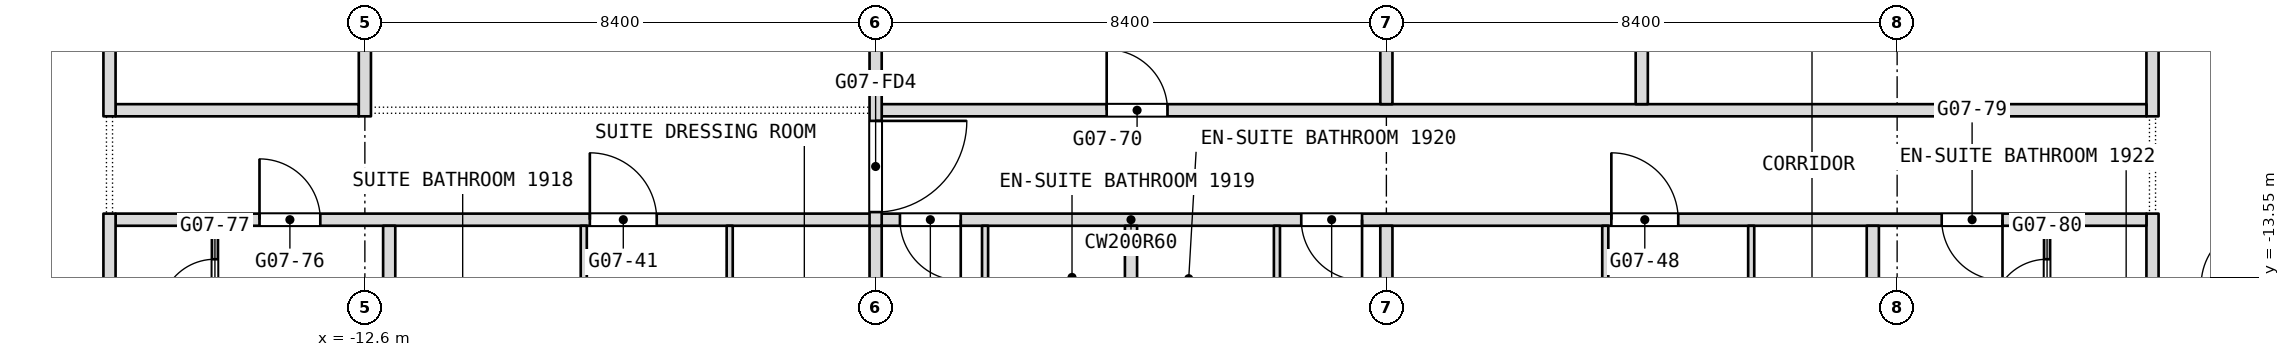
"""IFC4 building model, lengths in metres.
Left out: names, types, materials, properties, quantities, classifications, styles, units other than length and angle.
Written with IfcOpenShell. Run it as: python <this file> out.ifc"""

import sys

from ifc_helpers import new_model, si_unit, direction, frame, frame_2d, origin, place, context, subcontext, project, spatial, rectangle, extrude, element, fill, save


model = new_model("IFC4")
c1 = context("Model", 3, precision=1e-05, world=origin(), true_north=direction((0.0, 1.0)))
c2 = subcontext(c1, "Body", "Model", "MODEL_VIEW")
j1 = project(units=[si_unit("LENGTHUNIT", "METRE"), si_unit("PLANEANGLEUNIT", "RADIAN")], contexts=[c1])
p1 = place(None, origin())
s1 = spatial("IfcSite", under=j1, at=p1, CompositionType="ELEMENT")
p2 = place(p1, origin())
s2 = spatial("IfcBuilding", under=s1, at=p2, CompositionType="ELEMENT")
p3 = place(p2, frame((0.0, 0.0, 83.3)))
s3 = spatial("IfcBuildingStorey", under=s2, at=p3, CompositionType="ELEMENT", Elevation=83.3)
p4 = place(p3, frame((16.8, -17.143, 0.0), z_axis=(0.0, 0.0, 1.0), x_axis=(0.0, 1.0, 0.0)))
e1 = element("IfcWall", 1, at=p4, inside=s3, PredefinedType="PARTITIONING", context=c2, shape_type="SweptSolid", body=[
    extrude(rectangle(XDim=4.643, YDim=0.2, at=frame_2d((2.322, 0.0))), origin(), (0.0, 0.0, 1.0), 3.3),
])
p5 = place(p4, frame((0.771, 0.0, 0.0)))
e2 = element("IfcOpeningElement", 2, at=p5, cuts=e1, PredefinedType="OPENING", context=c2, shape_type="SweptSolid", body=[
    extrude(rectangle(XDim=0.9, YDim=2.1, at=frame_2d((0.45, 1.05))), frame((0.0, 0.1, 0.0), z_axis=(0.0, -1.0, 0.0), x_axis=(1.0, 0.0, 0.0)), (0.0, 0.0, 1.0), 0.2),
])
p6 = place(p3, frame((16.8, -10.9, 0.0), z_axis=(0.0, 0.0, 1.0), x_axis=(0.0, 1.0, 0.0)))
e3 = element("IfcWall", 3, at=p6, inside=s3, PredefinedType="PARTITIONING", context=c2, shape_type="SweptSolid", body=[
    extrude(rectangle(XDim=7.3, YDim=0.2, at=frame_2d((3.65, 0.0))), origin(), (0.0, 0.0, 1.0), 3.3),
])
p7 = place(p6, frame((3.15, 0.0, 0.0)))
e4 = element("IfcOpeningElement", 4, at=p7, cuts=e3, PredefinedType="OPENING", context=c2, shape_type="SweptSolid", body=[
    extrude(rectangle(XDim=1.0, YDim=2.1, at=frame_2d((0.5, 1.05))), frame((0.0, 0.1, 0.0), z_axis=(0.0, -1.0, 0.0), x_axis=(1.0, 0.0, 0.0)), (0.0, 0.0, 1.0), 0.2),
])
p8 = place(p3, frame((15.066, -14.9, 0.0), z_axis=(0.0, 0.0, 1.0), x_axis=(0.0, 1.0, 0.0)))
e5 = element("IfcWall", 5, at=p8, inside=s3, PredefinedType="PARTITIONING", context=c2, shape_type="SweptSolid", body=[
    extrude(rectangle(XDim=2.2, YDim=0.1, at=frame_2d((1.1, 0.0))), origin(), (0.0, 0.0, 1.0), 3.3),
])
p9 = place(p8, frame((0.75, 0.0, 0.0)))
e6 = element("IfcOpeningElement", 6, at=p9, cuts=e5, PredefinedType="OPENING", context=c2, shape_type="SweptSolid", body=[
    extrude(rectangle(XDim=0.9, YDim=2.1, at=frame_2d((0.45, 1.05))), frame((0.0, 0.05, 0.0), z_axis=(0.0, -1.0, 0.0), x_axis=(1.0, 0.0, 0.0)), (0.0, 0.0, 1.0), 0.1),
])
p10 = place(p3, frame((-16.7, -12.6, 0.0), z_axis=(0.0, 0.0, 1.0), x_axis=(1.0, 0.0, 0.0)))
e7 = element("IfcWall", 7, at=p10, inside=s3, PredefinedType="PARTITIONING", context=c2, shape_type="SweptSolid", body=[
    extrude(rectangle(XDim=33.4, YDim=0.2, at=frame_2d((16.7, 0.0))), origin(), (0.0, 0.0, 1.0), 3.3),
])
p11 = place(p10, frame((7.8, 0.0, 0.0)))
e8 = element("IfcOpeningElement", 8, at=p11, cuts=e7, PredefinedType="OPENING", context=c2, shape_type="SweptSolid", body=[
    extrude(rectangle(XDim=1.1, YDim=2.1, at=frame_2d((0.55, 1.05))), frame((0.0, 0.1, 0.0), z_axis=(0.0, -1.0, 0.0), x_axis=(1.0, 0.0, 0.0)), (0.0, 0.0, 1.0), 0.2),
])
p12 = place(p10, frame((12.9, 0.0, 0.0)))
e9 = element("IfcOpeningElement", 9, at=p12, cuts=e7, PredefinedType="OPENING", context=c2, shape_type="SweptSolid", body=[
    extrude(rectangle(XDim=1.0, YDim=2.1, at=frame_2d((0.5, 1.05))), frame((0.0, 0.1, 0.0), z_axis=(0.0, -1.0, 0.0), x_axis=(1.0, 0.0, 0.0)), (0.0, 0.0, 1.0), 0.2),
])
p13 = place(p10, frame((19.5, 0.0, 0.0)))
e10 = element("IfcOpeningElement", 10, at=p13, cuts=e7, PredefinedType="OPENING", context=c2, shape_type="SweptSolid", body=[
    extrude(rectangle(XDim=1.0, YDim=2.1, at=frame_2d((0.5, 1.05))), frame((0.0, 0.1, 0.0), z_axis=(0.0, -1.0, 0.0), x_axis=(1.0, 0.0, 0.0)), (0.0, 0.0, 1.0), 0.2),
])
p14 = place(p10, frame((24.6, 0.0, 0.0)))
e11 = element("IfcOpeningElement", 11, at=p14, cuts=e7, PredefinedType="OPENING", context=c2, shape_type="SweptSolid", body=[
    extrude(rectangle(XDim=1.1, YDim=2.1, at=frame_2d((0.55, 1.05))), frame((0.0, 0.1, 0.0), z_axis=(0.0, -1.0, 0.0), x_axis=(1.0, 0.0, 0.0)), (0.0, 0.0, 1.0), 0.2),
])
p15 = place(p10, frame((2.367, 0.0, 0.0)))
e12 = element("IfcOpeningElement", 12, at=p15, cuts=e7, PredefinedType="OPENING", context=c2, shape_type="SweptSolid", body=[
    extrude(rectangle(XDim=1.0, YDim=2.1, at=frame_2d((0.5, 1.05))), frame((0.0, 0.1, 0.0), z_axis=(0.0, -1.0, 0.0), x_axis=(1.0, 0.0, 0.0)), (0.0, 0.0, 1.0), 0.2),
])
p16 = place(p10, frame((30.033, 0.0, 0.0)))
e13 = element("IfcOpeningElement", 13, at=p16, cuts=e7, PredefinedType="OPENING", context=c2, shape_type="SweptSolid", body=[
    extrude(rectangle(XDim=1.0, YDim=2.1, at=frame_2d((0.5, 1.05))), frame((0.0, 0.1, 0.0), z_axis=(0.0, -1.0, 0.0), x_axis=(1.0, 0.0, 0.0)), (0.0, 0.0, 1.0), 0.2),
])
p17 = place(p3, frame((12.2, -15.8, 0.0), z_axis=(0.0, 0.0, 1.0), x_axis=(0.0, 1.0, 0.0)))
e14 = element("IfcWall", 14, at=p17, inside=s3, PredefinedType="PARTITIONING", context=c2, shape_type="SweptSolid", body=[
    extrude(rectangle(XDim=3.1, YDim=0.2, at=frame_2d((1.55, 0.0))), origin(), (0.0, 0.0, 1.0), 3.3),
])
p18 = place(p3, frame((-16.7, -10.8, 0.0), z_axis=(0.0, 0.0, 1.0), x_axis=(1.0, 0.0, 0.0)))
e15 = element("IfcWall", 15, at=p18, inside=s3, PredefinedType="PARTITIONING", context=c2, shape_type="SweptSolid", body=[
    extrude(rectangle(XDim=4.0, YDim=0.2, at=frame_2d((2.0, 0.0))), origin(), (0.0, 0.0, 1.0), 3.3),
])
p19 = place(p3, frame((-4.1, -10.8, 0.0), z_axis=(0.0, 0.0, 1.0), x_axis=(1.0, 0.0, 0.0)))
e16 = element("IfcWall", 16, at=p19, inside=s3, PredefinedType="PARTITIONING", context=c2, shape_type="SweptSolid", body=[
    extrude(rectangle(XDim=20.8, YDim=0.2, at=frame_2d((10.4, 0.0))), origin(), (0.0, 0.0, 1.0), 3.3),
])
p20 = place(p19, frame((3.7, 0.0, 0.0)))
e17 = element("IfcOpeningElement", 17, at=p20, cuts=e16, PredefinedType="OPENING", context=c2, shape_type="SweptSolid", body=[
    extrude(rectangle(XDim=1.0, YDim=2.1, at=frame_2d((0.5, 1.05))), frame((0.0, 0.1, 0.0), z_axis=(0.0, -1.0, 0.0), x_axis=(1.0, 0.0, 0.0)), (0.0, 0.0, 1.0), 0.2),
])
p21 = place(p3, frame((10.2, -16.25, 0.0), z_axis=(0.0, 0.0, 1.0), x_axis=(0.0, 1.0, 0.0)))
e18 = element("IfcWall", 18, at=p21, inside=s3, PredefinedType="PARTITIONING", context=c2, shape_type="SweptSolid", body=[
    extrude(rectangle(XDim=3.55, YDim=0.1, at=frame_2d((1.775, 0.0))), origin(), (0.0, 0.0, 1.0), 3.3),
])
p22 = place(p3, frame((8.4, -10.7, 0.0), z_axis=(0.0, 0.0, 1.0), x_axis=(0.0, 1.0, 0.0)))
e19 = element("IfcWall", 19, at=p22, inside=s3, PredefinedType="PARTITIONING", context=c2, shape_type="SweptSolid", body=[
    extrude(rectangle(XDim=3.6, YDim=0.2, at=frame_2d((1.8, 0.0))), origin(), (0.0, 0.0, 1.0), 3.3),
])
p23 = place(p3, frame((7.8, -16.15, 0.0), z_axis=(0.0, 0.0, 1.0), x_axis=(0.0, 1.0, 0.0)))
e20 = element("IfcWall", 20, at=p23, inside=s3, PredefinedType="PARTITIONING", context=c2, shape_type="SweptSolid", body=[
    extrude(rectangle(XDim=3.45, YDim=0.1, at=frame_2d((1.725, 0.0))), origin(), (0.0, 0.0, 1.0), 3.3),
])
p24 = place(p3, frame((4.2, -17.7, 0.0), z_axis=(0.0, 0.0, 1.0), x_axis=(0.0, 1.0, 0.0)))
e21 = element("IfcWall", 21, at=p24, inside=s3, PredefinedType="PARTITIONING", context=c2, shape_type="SweptSolid", body=[
    extrude(rectangle(XDim=5.0, YDim=0.2, at=frame_2d((2.5, 0.0))), origin(), (0.0, 0.0, 1.0), 2.486),
])
p25 = place(p3, frame((4.2, -10.7, 0.0), z_axis=(0.0, 0.0, 1.0), x_axis=(0.0, 1.0, 0.0)))
e22 = element("IfcWall", 22, at=p25, inside=s3, PredefinedType="PARTITIONING", context=c2, shape_type="SweptSolid", body=[
    extrude(rectangle(XDim=8.8, YDim=0.2, at=frame_2d((4.4, 0.0))), origin(), (0.0, 0.0, 1.0), 2.486),
])
p26 = place(p3, frame((2.4, -15.325, 0.0), z_axis=(0.0, 0.0, 1.0), x_axis=(0.0, 1.0, 0.0)))
e23 = element("IfcWall", 23, at=p26, inside=s3, PredefinedType="PARTITIONING", context=c2, shape_type="SweptSolid", body=[
    extrude(rectangle(XDim=2.625, YDim=0.1, at=frame_2d((1.312, 0.0))), origin(), (0.0, 0.0, 1.0), 3.3),
])
p27 = place(p3, frame((0.0, -17.7, 0.0), z_axis=(0.0, 0.0, 1.0), x_axis=(0.0, 1.0, 0.0)))
e24 = element("IfcWall", 24, at=p27, inside=s3, PredefinedType="PARTITIONING", context=c2, shape_type="SweptSolid", body=[
    extrude(rectangle(XDim=5.0, YDim=0.2, at=frame_2d((2.5, 0.0))), origin(), (0.0, 0.0, 1.0), 3.3),
])
p28 = place(p3, frame((-2.4, -15.425, 0.0), z_axis=(0.0, 0.0, 1.0), x_axis=(0.0, 1.0, 0.0)))
e25 = element("IfcWall", 25, at=p28, inside=s3, PredefinedType="PARTITIONING", context=c2, shape_type="SweptSolid", body=[
    extrude(rectangle(XDim=2.725, YDim=0.1, at=frame_2d((1.363, 0.0))), origin(), (0.0, 0.0, 1.0), 3.3),
])
p29 = place(p3, frame((-4.2, -17.7, 0.0), z_axis=(0.0, 0.0, 1.0), x_axis=(0.0, 1.0, 0.0)))
e26 = element("IfcWall", 26, at=p29, inside=s3, PredefinedType="PARTITIONING", context=c2, shape_type="SweptSolid", body=[
    extrude(rectangle(XDim=5.0, YDim=0.2, at=frame_2d((2.5, 0.0))), origin(), (0.0, 0.0, 1.0), 2.486),
])
p30 = place(p3, frame((-4.2, -12.7, 0.0), z_axis=(0.0, 0.0, 1.0), x_axis=(0.0, 1.0, 0.0)))
e27 = element("IfcWall", 27, at=p30, inside=s3, PredefinedType="PARTITIONING", context=c2, shape_type="SweptSolid", body=[
    extrude(rectangle(XDim=12.7, YDim=0.2, at=frame_2d((6.35, 0.0))), origin(), (0.0, 0.0, 1.0), 2.486),
])
p31 = place(p30, frame((11.05, 0.0, 0.0)))
e28 = element("IfcOpeningElement", 28, at=p31, cuts=e27, PredefinedType="OPENING", context=c2, shape_type="SweptSolid", body=[
    extrude(rectangle(XDim=1.5, YDim=2.1, at=frame_2d((0.75, 1.05))), frame((0.0, 0.1, 0.0), z_axis=(0.0, -1.0, 0.0), x_axis=(1.0, 0.0, 0.0)), (0.0, 0.0, 1.0), 0.2),
])
p32 = place(p30, frame((0.225, 0.0, 0.0)))
e29 = element("IfcOpeningElement", 29, at=p32, cuts=e27, PredefinedType="OPENING", context=c2, shape_type="SweptSolid", body=[
    extrude(rectangle(XDim=1.5, YDim=2.1, at=frame_2d((0.75, 1.05))), frame((0.0, 0.1, 0.0), z_axis=(0.0, -1.0, 0.0), x_axis=(1.0, 0.0, 0.0)), (0.0, 0.0, 1.0), 0.2),
])
p33 = place(p3, frame((-6.6, -16.25, 0.0), z_axis=(0.0, 0.0, 1.0), x_axis=(0.0, 1.0, 0.0)))
e30 = element("IfcWall", 30, at=p33, inside=s3, PredefinedType="PARTITIONING", context=c2, shape_type="SweptSolid", body=[
    extrude(rectangle(XDim=3.55, YDim=0.1, at=frame_2d((1.775, 0.0))), origin(), (0.0, 0.0, 1.0), 3.3),
])
p34 = place(p3, frame((-9.0, -16.15, 0.0), z_axis=(0.0, 0.0, 1.0), x_axis=(0.0, 1.0, 0.0)))
e31 = element("IfcWall", 31, at=p34, inside=s3, PredefinedType="PARTITIONING", context=c2, shape_type="SweptSolid", body=[
    extrude(rectangle(XDim=3.45, YDim=0.1, at=frame_2d((1.725, 0.0))), origin(), (0.0, 0.0, 1.0), 3.3),
])
p35 = place(p34, frame((0.94, 0.0, 0.0)))
e32 = element("IfcOpeningElement", 32, at=p35, cuts=e31, PredefinedType="OPENING", context=c2, shape_type="SweptSolid", body=[
    extrude(rectangle(XDim=0.9, YDim=2.1, at=frame_2d((0.45, 1.05))), frame((0.0, 0.05, 0.0), z_axis=(0.0, -1.0, 0.0), x_axis=(1.0, 0.0, 0.0)), (0.0, 0.0, 1.0), 0.1),
])
p36 = place(p3, frame((-12.2, -16.0, 0.0), z_axis=(0.0, 0.0, 1.0), x_axis=(0.0, 1.0, 0.0)))
e33 = element("IfcWall", 33, at=p36, inside=s3, PredefinedType="PARTITIONING", context=c2, shape_type="SweptSolid", body=[
    extrude(rectangle(XDim=3.3, YDim=0.2, at=frame_2d((1.65, 0.0))), origin(), (0.0, 0.0, 1.0), 3.3),
])
p37 = place(p3, frame((-12.6, -10.9, 0.0), z_axis=(0.0, 0.0, 1.0), x_axis=(0.0, 1.0, 0.0)))
e34 = element("IfcWall", 34, at=p37, inside=s3, PredefinedType="PARTITIONING", context=c2, shape_type="SweptSolid", body=[
    extrude(rectangle(XDim=5.6, YDim=0.2, at=frame_2d((2.8, 0.0))), origin(), (0.0, 0.0, 1.0), 2.486),
])
p38 = place(p3, frame((-15.066, -14.9, 0.0), z_axis=(0.0, 0.0, 1.0), x_axis=(0.0, 1.0, 0.0)))
e35 = element("IfcWall", 35, at=p38, inside=s3, PredefinedType="PARTITIONING", context=c2, shape_type="SweptSolid", body=[
    extrude(rectangle(XDim=2.2, YDim=0.1, at=frame_2d((1.1, 0.0))), origin(), (0.0, 0.0, 1.0), 3.3),
])
p39 = place(p38, frame((0.75, 0.0, 0.0)))
e36 = element("IfcOpeningElement", 36, at=p39, cuts=e35, PredefinedType="OPENING", context=c2, shape_type="SweptSolid", body=[
    extrude(rectangle(XDim=0.9, YDim=2.1, at=frame_2d((0.45, 1.05))), frame((0.0, 0.05, 0.0), z_axis=(0.0, -1.0, 0.0), x_axis=(1.0, 0.0, 0.0)), (0.0, 0.0, 1.0), 0.1),
])
p40 = place(p3, frame((-16.8, -17.143, 0.0), z_axis=(0.0, 0.0, 1.0), x_axis=(0.0, 1.0, 0.0)))
e37 = element("IfcWall", 37, at=p40, inside=s3, PredefinedType="PARTITIONING", context=c2, shape_type="SweptSolid", body=[
    extrude(rectangle(XDim=4.643, YDim=0.2, at=frame_2d((2.322, 0.0))), origin(), (0.0, 0.0, 1.0), 3.3),
])
p41 = place(p40, frame((0.772, 0.0, 0.0)))
e38 = element("IfcOpeningElement", 38, at=p41, cuts=e37, PredefinedType="OPENING", context=c2, shape_type="SweptSolid", body=[
    extrude(rectangle(XDim=0.9, YDim=2.1, at=frame_2d((0.45, 1.05))), frame((0.0, 0.1, 0.0), z_axis=(0.0, -1.0, 0.0), x_axis=(1.0, 0.0, 0.0)), (0.0, 0.0, 1.0), 0.2),
])
p42 = place(p3, frame((-16.8, -10.9, 0.0), z_axis=(0.0, 0.0, 1.0), x_axis=(0.0, 1.0, 0.0)))
e39 = element("IfcWall", 39, at=p42, inside=s3, PredefinedType="PARTITIONING", context=c2, shape_type="SweptSolid", body=[
    extrude(rectangle(XDim=9.0, YDim=0.2, at=frame_2d((4.5, 0.0))), origin(), (0.0, 0.0, 1.0), 3.3),
])
p43 = place(p9, origin())
e40 = element("IfcDoor", 40, at=p43, inside=s3, OperationType="SINGLE_SWING_RIGHT", PredefinedType="DOOR", context=c2, shape_type="SweptSolid", body=[
    extrude(rectangle(XDim=0.9, YDim=2.1, at=frame_2d((0.45, 1.05))), frame((0.0, 0.025, 0.0), z_axis=(0.0, -1.0, 0.0), x_axis=(1.0, 0.0, 0.0)), (0.0, 0.0, 1.0), 0.05),
])
fill(e6, e40)
p44 = place(p11, origin())
e41 = element("IfcDoor", 41, at=p44, inside=s3, OperationType="SINGLE_SWING_RIGHT", PredefinedType="DOOR", context=c2, shape_type="SweptSolid", body=[
    extrude(rectangle(XDim=1.1, YDim=2.1, at=frame_2d((0.55, 1.05))), frame((0.0, 0.025, 0.0), z_axis=(0.0, -1.0, 0.0), x_axis=(1.0, 0.0, 0.0)), (0.0, 0.0, 1.0), 0.05),
])
fill(e8, e41)
p45 = place(p12, origin())
e42 = element("IfcDoor", 42, at=p45, inside=s3, OperationType="SINGLE_SWING_RIGHT", PredefinedType="DOOR", context=c2, shape_type="SweptSolid", body=[
    extrude(rectangle(XDim=1.0, YDim=2.1, at=frame_2d((0.5, 1.05))), frame((0.0, 0.025, 0.0), z_axis=(0.0, -1.0, 0.0), x_axis=(1.0, 0.0, 0.0)), (0.0, 0.0, 1.0), 0.05),
])
fill(e9, e42)
p46 = place(p13, origin())
e43 = element("IfcDoor", 43, at=p46, inside=s3, OperationType="SINGLE_SWING_RIGHT", PredefinedType="DOOR", context=c2, shape_type="SweptSolid", body=[
    extrude(rectangle(XDim=1.0, YDim=2.1, at=frame_2d((0.5, 1.05))), frame((0.0, 0.025, 0.0), z_axis=(0.0, -1.0, 0.0), x_axis=(1.0, 0.0, 0.0)), (0.0, 0.0, 1.0), 0.05),
])
fill(e10, e43)
p47 = place(p14, origin())
e44 = element("IfcDoor", 44, at=p47, inside=s3, OperationType="SINGLE_SWING_RIGHT", PredefinedType="DOOR", context=c2, shape_type="SweptSolid", body=[
    extrude(rectangle(XDim=1.1, YDim=2.1, at=frame_2d((0.55, 1.05))), frame((0.0, 0.025, 0.0), z_axis=(0.0, -1.0, 0.0), x_axis=(1.0, 0.0, 0.0)), (0.0, 0.0, 1.0), 0.05),
])
fill(e11, e44)
p48 = place(p15, origin())
e45 = element("IfcDoor", 45, at=p48, inside=s3, OperationType="SINGLE_SWING_RIGHT", PredefinedType="DOOR", context=c2, shape_type="SweptSolid", body=[
    extrude(rectangle(XDim=1.0, YDim=2.1, at=frame_2d((0.5, 1.05))), frame((0.0, 0.025, 0.0), z_axis=(0.0, -1.0, 0.0), x_axis=(1.0, 0.0, 0.0)), (0.0, 0.0, 1.0), 0.05),
])
fill(e12, e45)
p49 = place(p16, origin())
e46 = element("IfcDoor", 46, at=p49, inside=s3, OperationType="SINGLE_SWING_LEFT", PredefinedType="DOOR", context=c2, shape_type="SweptSolid", body=[
    extrude(rectangle(XDim=1.0, YDim=2.1, at=frame_2d((0.5, 1.05))), frame((0.0, 0.025, 0.0), z_axis=(0.0, -1.0, 0.0), x_axis=(1.0, 0.0, 0.0)), (0.0, 0.0, 1.0), 0.05),
])
fill(e13, e46)
p50 = place(p20, origin())
e47 = element("IfcDoor", 47, at=p50, inside=s3, OperationType="SINGLE_SWING_RIGHT", PredefinedType="DOOR", context=c2, shape_type="SweptSolid", body=[
    extrude(rectangle(XDim=1.0, YDim=2.1, at=frame_2d((0.5, 1.05))), frame((0.0, 0.025, 0.0), z_axis=(0.0, -1.0, 0.0), x_axis=(1.0, 0.0, 0.0)), (0.0, 0.0, 1.0), 0.05),
])
fill(e17, e47)
p51 = place(p39, origin())
e48 = element("IfcDoor", 48, at=p51, inside=s3, OperationType="SINGLE_SWING_RIGHT", PredefinedType="DOOR", context=c2, shape_type="SweptSolid", body=[
    extrude(rectangle(XDim=0.9, YDim=2.1, at=frame_2d((0.45, 1.05))), frame((0.0, 0.025, 0.0), z_axis=(0.0, -1.0, 0.0), x_axis=(1.0, 0.0, 0.0)), (0.0, 0.0, 1.0), 0.05),
])
fill(e36, e48)
p52 = place(p32, origin())
e49 = element("IfcDoor", 49, at=p52, inside=s3, OperationType="DOUBLE_DOOR_DOUBLE_SWING", PredefinedType="DOOR", context=c2, shape_type="SweptSolid", body=[
    extrude(rectangle(XDim=1.5, YDim=2.1, at=frame_2d((0.75, 1.05))), frame((0.0, 0.025, 0.0), z_axis=(0.0, -1.0, 0.0), x_axis=(1.0, 0.0, 0.0)), (0.0, 0.0, 1.0), 0.05),
])
fill(e29, e49)
save(model, sys.argv[1])
